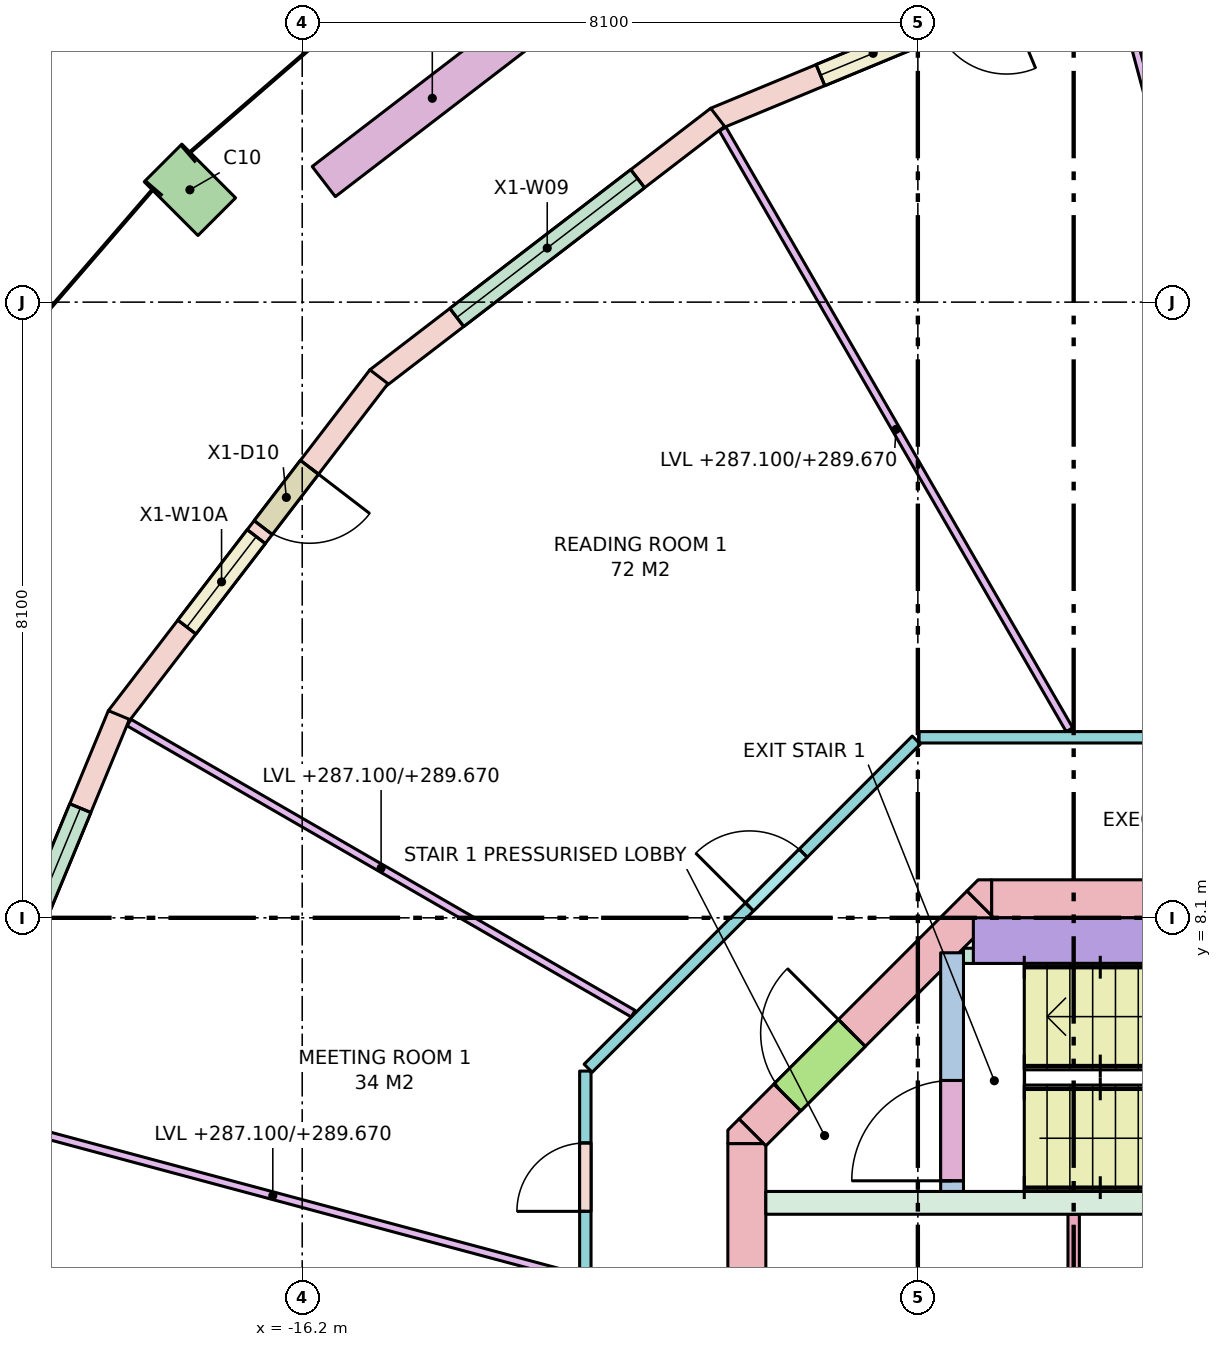
"""IFC4 building model, lengths in metres.
Left out: names, types, materials, properties, quantities, classifications, styles, units other than length and angle.
Written with IfcOpenShell. Run it as: python <this file> out.ifc"""

import sys

from ifc_helpers import new_model, si_unit, direction, frame, frame_2d, origin, origin_2d, place, context, subcontext, project, spatial, polyline, rectangle, outline, extrude, element, fill, save


model = new_model("IFC4")
c1 = context("Model", 3, precision=1e-05, world=origin(), true_north=direction((0.0, 1.0)))
c2 = subcontext(c1, "Body", "Model", "MODEL_VIEW")
j1 = project(units=[si_unit("LENGTHUNIT", "METRE"), si_unit("PLANEANGLEUNIT", "RADIAN")], contexts=[c1])
p1 = place(None, origin())
s1 = spatial("IfcSite", under=j1, at=p1, CompositionType="ELEMENT")
p2 = place(p1, origin())
s2 = spatial("IfcBuilding", under=s1, at=p2, CompositionType="ELEMENT")
p3 = place(p2, frame((0.0, 0.0, 287.1)))
s3 = spatial("IfcBuildingStorey", under=s2, at=p3, CompositionType="ELEMENT", Elevation=287.1)
p4 = place(p3, frame((-17.678, 17.678, 0.0), z_axis=(0.0, 0.0, 1.0), x_axis=(-0.707106781187, -0.707106781187, 0.0)))
e1 = element("IfcColumn", 1, at=p4, inside=s3, PredefinedType="COLUMN", context=c2, shape_type="SweptSolid", body=[
    extrude(rectangle(XDim=0.7, YDim=1.0, at=origin_2d()), origin(), (0.0, 0.0, 1.0), 3.7),
])
p5 = place(p3, frame((-7.13, 8.35, -0.28), z_axis=(0.0, 0.0, 1.0), x_axis=(1.0, 0.0, 0.0)))
e2 = element("IfcWall", 2, at=p5, inside=s3, PredefinedType="SHEAR", context=c2, shape_type="SweptSolid", body=[
    extrude(rectangle(XDim=14.26, YDim=0.5, at=frame_2d((7.13, 0.0))), origin(), (0.0, 0.0, 1.0), 3.7),
])
p6 = place(p5, frame((5.48, 0.0, 0.28)))
e3 = element("IfcOpeningElement", 3, at=p6, cuts=e2, PredefinedType="OPENING", context=c2, shape_type="SweptSolid", body=[
    extrude(rectangle(XDim=0.7, YDim=2.1, at=frame_2d((0.35, 1.05))), frame((0.0, 0.26, 0.0), z_axis=(0.0, -1.0, 0.0), x_axis=(1.0, 0.0, 0.0)), (0.0, 0.0, 1.0), 0.52),
])
p7 = place(p5, frame((7.155, 0.0, 0.28)))
e4 = element("IfcOpeningElement", 4, at=p7, cuts=e2, PredefinedType="OPENING", context=c2, shape_type="SweptSolid", body=[
    extrude(rectangle(XDim=0.9, YDim=2.1, at=frame_2d((0.45, 1.05))), frame((0.0, 0.26, 0.0), z_axis=(0.0, -1.0, 0.0), x_axis=(1.0, 0.0, 0.0)), (0.0, 0.0, 1.0), 0.52),
])
p8 = place(p3, frame((-10.35, -5.13, -0.28), z_axis=(0.0, 0.0, 1.0), x_axis=(0.0, 1.0, 0.0)))
e5 = element("IfcWall", 5, at=p8, inside=s3, PredefinedType="SHEAR", context=c2, shape_type="SweptSolid", body=[
    extrude(rectangle(XDim=10.26, YDim=0.5, at=frame_2d((5.13, 0.0))), origin(), (0.0, 0.0, 1.0), 3.7),
])
p9 = place(p8, frame((4.13, 0.0, 0.28)))
e6 = element("IfcOpeningElement", 6, at=p9, cuts=e5, PredefinedType="OPENING", context=c2, shape_type="SweptSolid", body=[
    extrude(rectangle(XDim=2.0, YDim=2.1, at=frame_2d((1.0, 1.05))), frame((0.0, 0.26, 0.0), z_axis=(0.0, -1.0, 0.0), x_axis=(1.0, 0.0, 0.0)), (0.0, 0.0, 1.0), 0.52),
])
p10 = place(p3, frame((-10.277, 5.277, -0.28), z_axis=(0.0, 0.0, 1.0), x_axis=(0.707106781187, 0.707106781187, 0.0)))
e7 = element("IfcWall", 7, at=p10, inside=s3, PredefinedType="SHEAR", context=c2, shape_type="SweptSolid", body=[
    extrude(rectangle(XDim=4.243, YDim=0.5, at=frame_2d((2.121, 0.0))), origin(), (0.0, 0.0, 1.0), 3.7),
])
p11 = place(p10, frame((0.65, 0.0, 0.28)))
e8 = element("IfcOpeningElement", 8, at=p11, cuts=e7, PredefinedType="OPENING", context=c2, shape_type="SweptSolid", body=[
    extrude(rectangle(XDim=1.2, YDim=2.1, at=frame_2d((0.6, 1.05))), frame((0.0, 0.26, 0.0), z_axis=(0.0, -1.0, 0.0), x_axis=(1.0, 0.0, 0.0)), (0.0, 0.0, 1.0), 0.52),
])
p12 = place(p3, frame((0.0, 0.0, -0.28)))
e9 = element("IfcWall", 9, at=p12, inside=s3, PredefinedType="SHEAR", context=c2, shape_type="SweptSolid", body=[
    extrude(outline(polyline([(-10.454, 5.454), (-10.13, 5.13), (-10.6, 5.13), (-10.6, 5.307), (-10.454, 5.454)])), origin(), (0.0, 0.0, 1.0), 3.7),
])
p13 = place(p3, frame((0.0, 0.0, -0.28)))
e10 = element("IfcWall", 10, at=p13, inside=s3, PredefinedType="SHEAR", context=c2, shape_type="SweptSolid", body=[
    extrude(outline(polyline([(-7.307, 8.6), (-7.13, 8.6), (-7.13, 8.13), (-7.454, 8.454), (-7.307, 8.6)])), origin(), (0.0, 0.0, 1.0), 3.7),
])
p14 = place(p3, frame((-10.1, 4.35, 0.0), z_axis=(0.0, 0.0, 1.0), x_axis=(1.0, 0.0, 0.0)))
e11 = element("IfcWall", 11, at=p14, inside=s3, PredefinedType="SOLIDWALL", context=c2, shape_type="SweptSolid", body=[
    extrude(rectangle(XDim=8.1, YDim=0.3, at=frame_2d((4.05, 0.0))), origin(), (0.0, 0.0, 1.0), 3.42),
])
p15 = place(p3, frame((-7.65, 4.5, 0.0), z_axis=(0.0, 0.0, 1.0), x_axis=(0.0, 1.0, 0.0)))
e12 = element("IfcWall", 12, at=p15, inside=s3, PredefinedType="SHEAR", context=c2, shape_type="SweptSolid", body=[
    extrude(rectangle(XDim=3.14, YDim=0.3, at=frame_2d((1.57, 0.0))), origin(), (0.0, 0.0, 1.0), 3.42),
])
p16 = place(p15, frame((0.14, 0.0, 0.0)))
e13 = element("IfcOpeningElement", 13, at=p16, cuts=e12, PredefinedType="OPENING", context=c2, shape_type="SweptSolid", body=[
    extrude(rectangle(XDim=1.32, YDim=2.1, at=frame_2d((0.66, 1.05))), frame((0.0, 0.16, 0.0), z_axis=(0.0, -1.0, 0.0), x_axis=(1.0, 0.0, 0.0)), (0.0, 0.0, 1.0), 0.32),
])
p17 = place(p3, frame((-7.37, 7.8, 0.0), z_axis=(0.0, 0.0, 1.0), x_axis=(1.0, 0.0, 0.0)))
e14 = element("IfcWall", 14, at=p17, inside=s3, PredefinedType="SHEAR", context=c2, shape_type="SweptSolid", body=[
    extrude(rectangle(XDim=5.37, YDim=0.6, at=frame_2d((2.685, 0.0))), origin(), (0.0, 0.0, 1.0), 3.42),
])
p18 = place(p3, frame((-7.5, 7.6, 0.0), z_axis=(0.0, 0.0, 1.0), x_axis=(1.0, 0.0, 0.0)))
e15 = element("IfcWall", 15, at=p18, inside=s3, PredefinedType="SHEAR", context=c2, shape_type="SweptSolid", body=[
    extrude(rectangle(XDim=0.6, YDim=0.2, at=frame_2d((0.3, 0.0))), origin(), (0.0, 0.0, 1.0), 3.42),
])
p19 = place(p3, frame((-5.546, 20.775, 0.0), z_axis=(0.0, 0.0, 1.0), x_axis=(-0.923888907244, -0.382660798975, 0.0)))
e16 = element("IfcWall", 16, at=p19, inside=s3, PredefinedType="STANDARD", context=c2, shape_type="SweptSolid", body=[
    extrude(rectangle(XDim=5.652, YDim=0.3, at=frame_2d((2.826, 0.0))), origin(), (0.0, 0.0, 1.0), 3.42),
])
p20 = place(p19, frame((1.501, 0.0, 0.0)))
e17 = element("IfcOpeningElement", 17, at=p20, cuts=e16, PredefinedType="OPENING", context=c2, shape_type="SweptSolid", body=[
    extrude(rectangle(XDim=1.0, YDim=2.4, at=frame_2d((0.5, 1.2))), frame((0.0, 0.16, 0.0), z_axis=(0.0, -1.0, 0.0), x_axis=(1.0, 0.0, 0.0)), (0.0, 0.0, 1.0), 0.32),
])
p21 = place(p19, frame((2.651, 0.0, 0.8)))
e18 = element("IfcOpeningElement", 18, at=p21, cuts=e16, PredefinedType="OPENING", context=c2, shape_type="SweptSolid", body=[
    extrude(rectangle(XDim=1.5, YDim=2.4, at=frame_2d((0.75, 1.2))), frame((0.0, 0.16, 0.0), z_axis=(0.0, -1.0, 0.0), x_axis=(1.0, 0.0, 0.0)), (0.0, 0.0, 1.0), 0.32),
])
p22 = place(p3, frame((-10.734, 18.632, 0.0), z_axis=(0.0, 0.0, 1.0), x_axis=(-0.793363662257, -0.608747976925, 0.0)))
e19 = element("IfcWall", 19, at=p22, inside=s3, PredefinedType="STANDARD", context=c2, shape_type="SweptSolid", body=[
    extrude(rectangle(XDim=5.652, YDim=0.3, at=frame_2d((2.826, 0.0))), origin(), (0.0, 0.0, 1.0), 3.42),
])
p23 = place(p22, frame((1.326, 0.0, 0.8)))
e20 = element("IfcOpeningElement", 20, at=p23, cuts=e19, PredefinedType="OPENING", context=c2, shape_type="SweptSolid", body=[
    extrude(rectangle(XDim=3.0, YDim=2.4, at=frame_2d((1.5, 1.2))), frame((0.0, 0.16, 0.0), z_axis=(0.0, -1.0, 0.0), x_axis=(1.0, 0.0, 0.0)), (0.0, 0.0, 1.0), 0.32),
])
p24 = place(p3, frame((-15.191, 15.219, 0.0), z_axis=(0.0, 0.0, 1.0), x_axis=(-0.608747976925, -0.793363662257, 0.0)))
e21 = element("IfcWall", 21, at=p24, inside=s3, PredefinedType="STANDARD", context=c2, shape_type="SweptSolid", body=[
    extrude(rectangle(XDim=5.652, YDim=0.3, at=frame_2d((2.826, 0.0))), origin(), (0.0, 0.0, 1.0), 3.42),
])
p25 = place(p24, frame((1.501, 0.0, 0.0)))
e22 = element("IfcOpeningElement", 22, at=p25, cuts=e21, PredefinedType="OPENING", context=c2, shape_type="SweptSolid", body=[
    extrude(rectangle(XDim=1.0, YDim=2.4, at=frame_2d((0.5, 1.2))), frame((0.0, 0.16, 0.0), z_axis=(0.0, -1.0, 0.0), x_axis=(1.0, 0.0, 0.0)), (0.0, 0.0, 1.0), 0.32),
])
p26 = place(p24, frame((2.651, 0.0, 0.8)))
e23 = element("IfcOpeningElement", 23, at=p26, cuts=e21, PredefinedType="OPENING", context=c2, shape_type="SweptSolid", body=[
    extrude(rectangle(XDim=1.5, YDim=2.4, at=frame_2d((0.75, 1.2))), frame((0.0, 0.16, 0.0), z_axis=(0.0, -1.0, 0.0), x_axis=(1.0, 0.0, 0.0)), (0.0, 0.0, 1.0), 0.32),
])
p27 = place(p3, frame((-18.612, 10.768, 0.0), z_axis=(0.0, 0.0, 1.0), x_axis=(-0.382660798975, -0.923888907244, 0.0)))
e24 = element("IfcWall", 24, at=p27, inside=s3, PredefinedType="STANDARD", context=c2, shape_type="SweptSolid", body=[
    extrude(rectangle(XDim=5.652, YDim=0.3, at=frame_2d((2.826, 0.0))), origin(), (0.0, 0.0, 1.0), 3.42),
])
p28 = place(p27, frame((1.326, 0.0, 0.8)))
e25 = element("IfcOpeningElement", 25, at=p28, cuts=e24, PredefinedType="OPENING", context=c2, shape_type="SweptSolid", body=[
    extrude(rectangle(XDim=3.0, YDim=2.4, at=frame_2d((1.5, 1.2))), frame((0.0, 0.16, 0.0), z_axis=(0.0, -1.0, 0.0), x_axis=(1.0, 0.0, 0.0)), (0.0, 0.0, 1.0), 0.32),
])
p29 = place(p3, frame((-13.061, 19.978, 0.0), z_axis=(0.0, 0.0, 1.0), x_axis=(-0.793326845617, -0.608795955984, 0.0)))
e26 = element("IfcWall", 26, at=p29, inside=s3, PredefinedType="PARAPET", context=c2, shape_type="SweptSolid", body=[
    extrude(rectangle(XDim=3.6, YDim=0.5, at=frame_2d((1.8, 0.0))), origin(), (0.0, 0.0, 1.0), 0.9),
])
p30 = place(p3, frame((-6.05, 1.65, 0.0), z_axis=(0.0, 0.0, 1.0), x_axis=(0.0, 1.0, 0.0)))
e27 = element("IfcWall", 27, at=p30, inside=s3, PredefinedType="PARTITIONING", context=c2, shape_type="SweptSolid", body=[
    extrude(rectangle(XDim=2.55, YDim=0.15, at=frame_2d((1.275, 0.0))), origin(), (0.0, 0.0, 1.0), 3.42),
])
p31 = place(p3, frame((-12.475, -6.084, 0.0), z_axis=(0.0, 0.0, 1.0), x_axis=(0.0, 1.0, 0.0)))
e28 = element("IfcWall", 28, at=p31, inside=s3, PredefinedType="PARTITIONING", context=c2, shape_type="SweptSolid", body=[
    extrude(rectangle(XDim=12.167, YDim=0.15, at=frame_2d((6.084, 0.0))), origin(), (0.0, 0.0, 1.0), 2.57),
])
p32 = place(p31, frame((10.322, 0.0, 0.0)))
e29 = element("IfcOpeningElement", 29, at=p32, cuts=e28, PredefinedType="OPENING", context=c2, shape_type="SweptSolid", body=[
    extrude(rectangle(XDim=0.9, YDim=2.1, at=frame_2d((0.45, 1.05))), frame((0.0, 0.085, 0.0), z_axis=(0.0, -1.0, 0.0), x_axis=(1.0, 0.0, 0.0)), (0.0, 0.0, 1.0), 0.17),
])
p33 = place(p31, frame((7.256, 0.0, 0.0)))
e30 = element("IfcOpeningElement", 30, at=p33, cuts=e28, PredefinedType="OPENING", context=c2, shape_type="SweptSolid", body=[
    extrude(rectangle(XDim=1.0, YDim=2.1, at=frame_2d((0.5, 1.05))), frame((0.0, 0.085, 0.0), z_axis=(0.0, -1.0, 0.0), x_axis=(1.0, 0.0, 0.0)), (0.0, 0.0, 1.0), 0.17),
])
p34 = place(p31, frame((3.912, 0.0, 0.0)))
e31 = element("IfcOpeningElement", 31, at=p34, cuts=e28, PredefinedType="OPENING", context=c2, shape_type="SweptSolid", body=[
    extrude(rectangle(XDim=1.0, YDim=2.1, at=frame_2d((0.5, 1.05))), frame((0.0, 0.085, 0.0), z_axis=(0.0, -1.0, 0.0), x_axis=(1.0, 0.0, 0.0)), (0.0, 0.0, 1.0), 0.17),
])
p35 = place(p31, frame((0.946, 0.0, 0.0)))
e32 = element("IfcOpeningElement", 32, at=p35, cuts=e28, PredefinedType="OPENING", context=c2, shape_type="SweptSolid", body=[
    extrude(rectangle(XDim=0.9, YDim=2.1, at=frame_2d((0.45, 1.05))), frame((0.0, 0.085, 0.0), z_axis=(0.0, -1.0, 0.0), x_axis=(1.0, 0.0, 0.0)), (0.0, 0.0, 1.0), 0.17),
])
p36 = place(p3, frame((-12.438, 6.121, 0.0), z_axis=(0.0, 0.0, 1.0), x_axis=(0.707106781187, 0.707106781187, 0.0)))
e33 = element("IfcWall", 33, at=p36, inside=s3, PredefinedType="PARTITIONING", context=c2, shape_type="SweptSolid", body=[
    extrude(rectangle(XDim=6.105, YDim=0.15, at=frame_2d((3.053, 0.0))), origin(), (0.0, 0.0, 1.0), 2.57),
])
p37 = place(p36, frame((3.002, 0.0, 0.0)))
e34 = element("IfcOpeningElement", 34, at=p37, cuts=e33, PredefinedType="OPENING", context=c2, shape_type="SweptSolid", body=[
    extrude(rectangle(XDim=1.0, YDim=2.1, at=frame_2d((0.5, 1.05))), frame((0.0, 0.085, 0.0), z_axis=(0.0, -1.0, 0.0), x_axis=(1.0, 0.0, 0.0)), (0.0, 0.0, 1.0), 0.17),
])
p38 = place(p3, frame((-8.084, 10.475, 0.0), z_axis=(0.0, 0.0, 1.0), x_axis=(1.0, 0.0, 0.0)))
e35 = element("IfcWall", 35, at=p38, inside=s3, PredefinedType="PARTITIONING", context=c2, shape_type="SweptSolid", body=[
    extrude(rectangle(XDim=16.167, YDim=0.15, at=frame_2d((8.084, 0.0))), origin(), (0.0, 0.0, 1.0), 2.57),
])
p39 = place(p38, frame((13.004, 0.0, 0.0)))
e36 = element("IfcOpeningElement", 36, at=p39, cuts=e35, PredefinedType="OPENING", context=c2, shape_type="SweptSolid", body=[
    extrude(rectangle(XDim=1.0, YDim=2.1, at=frame_2d((0.5, 1.05))), frame((0.0, 0.085, 0.0), z_axis=(0.0, -1.0, 0.0), x_axis=(1.0, 0.0, 0.0)), (0.0, 0.0, 1.0), 0.17),
])
p40 = place(p38, frame((7.184, 0.0, 0.0)))
e37 = element("IfcOpeningElement", 37, at=p40, cuts=e35, PredefinedType="OPENING", context=c2, shape_type="SweptSolid", body=[
    extrude(rectangle(XDim=1.8, YDim=2.1, at=frame_2d((0.9, 1.05))), frame((0.0, 0.085, 0.0), z_axis=(0.0, -1.0, 0.0), x_axis=(1.0, 0.0, 0.0)), (0.0, 0.0, 1.0), 0.17),
])
p41 = place(p38, frame((3.153, 0.0, 0.0)))
e38 = element("IfcOpeningElement", 38, at=p41, cuts=e35, PredefinedType="OPENING", context=c2, shape_type="SweptSolid", body=[
    extrude(rectangle(XDim=1.0, YDim=2.1, at=frame_2d((0.5, 1.05))), frame((0.0, 0.085, 0.0), z_axis=(0.0, -1.0, 0.0), x_axis=(1.0, 0.0, 0.0)), (0.0, 0.0, 1.0), 0.17),
])
p42 = place(p3, frame((-2.831, 10.564, 0.0), z_axis=(0.0, 0.0, 1.0), x_axis=(-0.258796321138, 0.965931914871, 0.0)))
e39 = element("IfcWall", 39, at=p42, inside=s3, PredefinedType="PARTITIONING", context=c2, shape_type="SweptSolid", body=[
    extrude(rectangle(XDim=10.4, YDim=0.1, at=frame_2d((5.2, 0.0))), origin(), (0.0, 0.0, 1.0), 2.57),
])
p43 = place(p3, frame((-6.105, 10.575, 0.0), z_axis=(0.0, 0.0, 1.0), x_axis=(-0.500020406621, 0.866013621696, 0.0)))
e40 = element("IfcWall", 40, at=p43, inside=s3, PredefinedType="PARTITIONING", context=c2, shape_type="SweptSolid", body=[
    extrude(rectangle(XDim=9.126, YDim=0.1, at=frame_2d((4.563, 0.0))), origin(), (0.0, 0.0, 1.0), 2.57),
])
p44 = place(p3, frame((-11.846, 6.839, 0.0), z_axis=(0.0, 0.0, 1.0), x_axis=(-0.866007734672, 0.500030602552, 0.0)))
e41 = element("IfcWall", 41, at=p44, inside=s3, PredefinedType="PARTITIONING", context=c2, shape_type="SweptSolid", body=[
    extrude(rectangle(XDim=7.658, YDim=0.1, at=frame_2d((3.829, 0.0))), origin(), (0.0, 0.0, 1.0), 2.57),
])
p45 = place(p3, frame((-12.564, 3.367, 0.0), z_axis=(0.0, 0.0, 1.0), x_axis=(-0.965933136847, 0.258791760188, 0.0)))
e42 = element("IfcWall", 42, at=p45, inside=s3, PredefinedType="PARTITIONING", context=c2, shape_type="SweptSolid", body=[
    extrude(rectangle(XDim=8.329, YDim=0.1, at=frame_2d((4.165, 0.0))), origin(), (0.0, 0.0, 1.0), 2.57),
])
p46 = place(p21, origin())
e43 = element("IfcWindow", 43, at=p46, inside=s3, PartitioningType="SINGLE_PANEL", PredefinedType="WINDOW", context=c2, shape_type="SweptSolid", body=[
    extrude(rectangle(XDim=1.5, YDim=2.4, at=frame_2d((0.75, 1.2))), frame((0.0, 0.03, 0.0), z_axis=(0.0, -1.0, 0.0), x_axis=(1.0, 0.0, 0.0)), (0.0, 0.0, 1.0), 0.06),
])
fill(e18, e43)
p47 = place(p23, origin())
e44 = element("IfcWindow", 44, at=p47, inside=s3, PartitioningType="SINGLE_PANEL", PredefinedType="WINDOW", context=c2, shape_type="SweptSolid", body=[
    extrude(rectangle(XDim=3.0, YDim=2.4, at=frame_2d((1.5, 1.2))), frame((0.0, 0.03, 0.0), z_axis=(0.0, -1.0, 0.0), x_axis=(1.0, 0.0, 0.0)), (0.0, 0.0, 1.0), 0.06),
])
fill(e20, e44)
p48 = place(p25, origin())
e45 = element("IfcDoor", 45, at=p48, inside=s3, OperationType="SINGLE_SWING_LEFT", PredefinedType="DOOR", context=c2, shape_type="SweptSolid", body=[
    extrude(rectangle(XDim=1.0, YDim=2.4, at=frame_2d((0.5, 1.2))), frame((0.0, 0.025, 0.0), z_axis=(0.0, -1.0, 0.0), x_axis=(1.0, 0.0, 0.0)), (0.0, 0.0, 1.0), 0.05),
])
fill(e22, e45)
p49 = place(p26, origin())
e46 = element("IfcWindow", 46, at=p49, inside=s3, PartitioningType="SINGLE_PANEL", PredefinedType="WINDOW", context=c2, shape_type="SweptSolid", body=[
    extrude(rectangle(XDim=1.5, YDim=2.4, at=frame_2d((0.75, 1.2))), frame((0.0, 0.03, 0.0), z_axis=(0.0, -1.0, 0.0), x_axis=(1.0, 0.0, 0.0)), (0.0, 0.0, 1.0), 0.06),
])
fill(e23, e46)
p50 = place(p28, origin())
e47 = element("IfcWindow", 47, at=p50, inside=s3, PartitioningType="SINGLE_PANEL", PredefinedType="WINDOW", context=c2, shape_type="SweptSolid", body=[
    extrude(rectangle(XDim=3.0, YDim=2.4, at=frame_2d((1.5, 1.2))), frame((0.0, 0.03, 0.0), z_axis=(0.0, -1.0, 0.0), x_axis=(1.0, 0.0, 0.0)), (0.0, 0.0, 1.0), 0.06),
])
fill(e25, e47)
p51 = place(p16, origin())
e48 = element("IfcDoor", 48, at=p51, inside=s3, OperationType="DOUBLE_DOOR_SINGLE_SWING", PredefinedType="DOOR", context=c2, shape_type="SweptSolid", body=[
    extrude(rectangle(XDim=1.32, YDim=2.1, at=frame_2d((0.66, 1.05))), frame((0.0, 0.025, 0.0), z_axis=(0.0, -1.0, 0.0), x_axis=(1.0, 0.0, 0.0)), (0.0, 0.0, 1.0), 0.05),
])
fill(e13, e48)
p52 = place(p11, origin())
e49 = element("IfcDoor", 49, at=p52, inside=s3, OperationType="SINGLE_SWING_RIGHT", PredefinedType="DOOR", context=c2, shape_type="SweptSolid", body=[
    extrude(rectangle(XDim=1.2, YDim=2.1, at=frame_2d((0.6, 1.05))), frame((0.0, 0.025, 0.0), z_axis=(0.0, -1.0, 0.0), x_axis=(1.0, 0.0, 0.0)), (0.0, 0.0, 1.0), 0.05),
])
fill(e8, e49)
p53 = place(p37, origin())
e50 = element("IfcDoor", 50, at=p53, inside=s3, OperationType="SINGLE_SWING_LEFT", PredefinedType="DOOR", context=c2, shape_type="SweptSolid", body=[
    extrude(rectangle(XDim=1.0, YDim=2.1, at=frame_2d((0.5, 1.05))), frame((0.0, 0.025, 0.0), z_axis=(0.0, -1.0, 0.0), x_axis=(1.0, 0.0, 0.0)), (0.0, 0.0, 1.0), 0.05),
])
fill(e34, e50)
p54 = place(p32, origin())
e51 = element("IfcDoor", 51, at=p54, inside=s3, OperationType="SINGLE_SWING_LEFT", PredefinedType="DOOR", context=c2, shape_type="SweptSolid", body=[
    extrude(rectangle(XDim=0.9, YDim=2.1, at=frame_2d((0.45, 1.05))), frame((0.0, 0.025, 0.0), z_axis=(0.0, -1.0, 0.0), x_axis=(1.0, 0.0, 0.0)), (0.0, 0.0, 1.0), 0.05),
])
fill(e29, e51)
save(model, sys.argv[1])
